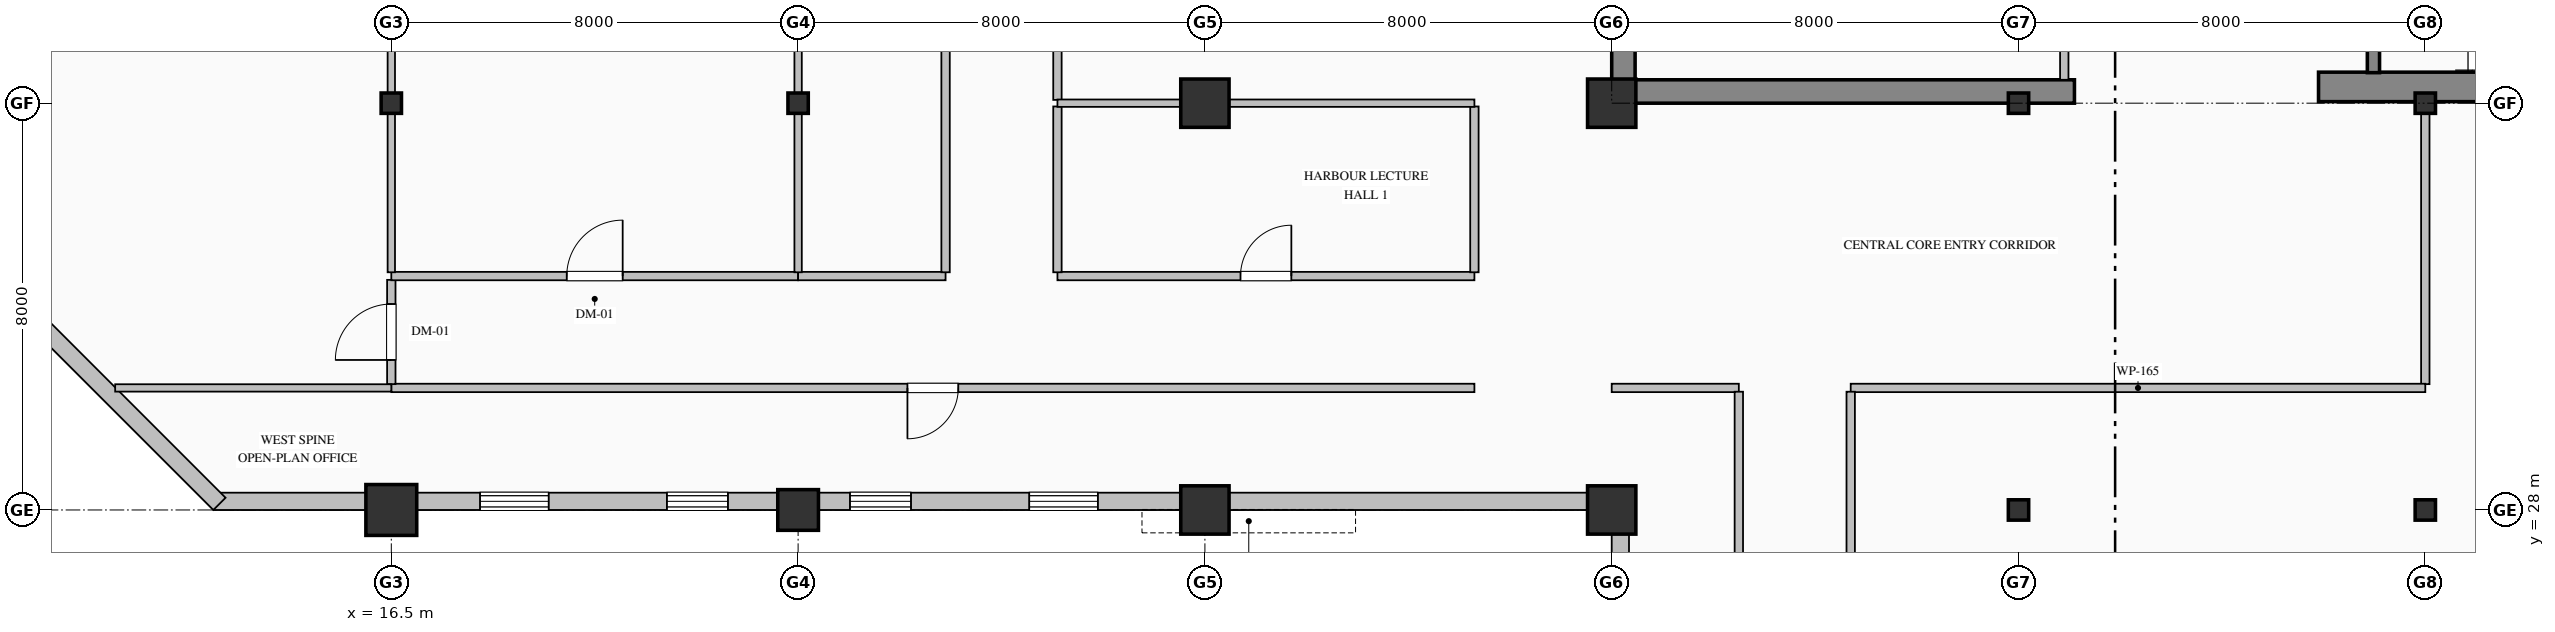
"""IFC4 building model, lengths in metres.
Left out: names, types, materials, properties, quantities, classifications, styles, units other than length and angle.
Written with IfcOpenShell. Run it as: python <this file> out.ifc"""

import sys

from ifc_helpers import new_model, si_unit, direction, frame, frame_2d, origin, origin_2d, place, context, subcontext, project, spatial, rectangle, hollow_rectangle, hollow_circle, i_section, extrude, element, fill, save


model = new_model("IFC4")
c1 = context("Model", 3, precision=1e-05, world=origin(), true_north=direction((0.0, 1.0)))
c2 = subcontext(c1, "Body", "Model", "MODEL_VIEW")
j1 = project(units=[si_unit("LENGTHUNIT", "METRE"), si_unit("PLANEANGLEUNIT", "RADIAN")], contexts=[c1])
p1 = place(None, origin())
s1 = spatial("IfcSite", under=j1, at=p1, CompositionType="ELEMENT")
p2 = place(p1, origin())
s2 = spatial("IfcBuilding", under=s1, at=p2, CompositionType="ELEMENT")
p3 = place(p2, frame((0.0, 0.0, 217.8)))
s3 = spatial("IfcBuildingStorey", under=s2, at=p3, CompositionType="ELEMENT", Elevation=217.8)
p4 = place(p3, frame((40.73, 36.46, 0.0), z_axis=(0.0, 0.0, 1.0), x_axis=(0.0, 1.0, 0.0)))
e1 = element("IfcWall", 1, at=p4, inside=s3, PredefinedType="SHEAR", context=c2, shape_type="SweptSolid", body=[
    extrude(rectangle(XDim=7.94, YDim=0.46, at=frame_2d((3.97, 0.0))), origin(), (0.0, 0.0, 1.0), 3.775),
])
p5 = place(p3, frame((40.5, 36.23, 0.0), z_axis=(0.0, 0.0, 1.0), x_axis=(1.0, 0.0, 0.0)))
e2 = element("IfcWall", 2, at=p5, inside=s3, PredefinedType="SHEAR", context=c2, shape_type="SweptSolid", body=[
    extrude(rectangle(XDim=9.1, YDim=0.46, at=frame_2d((4.55, 0.0))), origin(), (0.0, 0.0, 1.0), 3.775),
])
p6 = place(p3, frame((54.4, 36.32, 0.0), z_axis=(0.0, 0.0, 1.0), x_axis=(1.0, 0.0, 0.0)))
e3 = element("IfcWall", 3, at=p6, inside=s3, PredefinedType="SHEAR", context=c2, shape_type="SweptSolid", body=[
    extrude(rectangle(XDim=9.6, YDim=0.58, at=frame_2d((4.8, 0.0))), origin(), (0.0, 0.0, 1.0), 4.0),
])
p7 = place(p3, frame((16.5, 28.0, 0.0), z_axis=(0.0, 0.0, 1.0), x_axis=(1.0, 0.0, 0.0)))
e4 = element("IfcColumn", 4, at=p7, inside=s3, PredefinedType="COLUMN", context=c2, shape_type="SweptSolid", body=[
    extrude(hollow_circle(Radius=0.5, WallThickness=0.036, at=origin_2d()), origin(), (0.0, 0.0, 1.0), 4.0),
])
p8 = place(p3, frame((16.5, 36.0, 0.0), z_axis=(0.0, 0.0, 1.0), x_axis=(1.0, 0.0, 0.0)))
e5 = element("IfcColumn", 5, at=p8, inside=s3, PredefinedType="COLUMN", context=c2, shape_type="SweptSolid", body=[
    extrude(i_section(OverallWidth=0.4, OverallDepth=0.4, WebThickness=0.013, FlangeThickness=0.021, FilletRadius=0.022, at=origin_2d()), origin(), (0.0, 0.0, 1.0), 4.0),
])
p9 = place(p3, frame((24.5, 28.0, 0.0), z_axis=(0.0, 0.0, 1.0), x_axis=(1.0, 0.0, 0.0)))
e6 = element("IfcColumn", 6, at=p9, inside=s3, PredefinedType="COLUMN", context=c2, shape_type="SweptSolid", body=[
    extrude(hollow_rectangle(XDim=0.8, YDim=0.8, WallThickness=0.032, at=origin_2d()), origin(), (0.0, 0.0, 1.0), 4.0),
])
p10 = place(p3, frame((24.5, 36.0, 0.0), z_axis=(0.0, 0.0, 1.0), x_axis=(1.0, 0.0, 0.0)))
e7 = element("IfcColumn", 7, at=p10, inside=s3, PredefinedType="COLUMN", context=c2, shape_type="SweptSolid", body=[
    extrude(i_section(OverallWidth=0.4, OverallDepth=0.4, WebThickness=0.013, FlangeThickness=0.021, FilletRadius=0.022, at=origin_2d()), origin(), (0.0, 0.0, 1.0), 4.0),
])
for number, where, z_axis, x_axis in (
    (8, (32.5, 28.0, 0.0), (0.0, 0.0, 1.0), (1.0, 0.0, 0.0)),
    (9, (32.5, 36.0, 0.0), (0.0, 0.0, 1.0), (1.0, 0.0, 0.0)),
    (10, (40.5, 28.0, 0.0), (0.0, 0.0, 1.0), (1.0, 0.0, 0.0)),
    (11, (40.5, 36.0, 0.0), (0.0, 0.0, 1.0), (1.0, 0.0, 0.0)),
):
    element("IfcColumn", number, at=place(p3, frame(where, z_axis=z_axis, x_axis=x_axis)), inside=s3, PredefinedType="COLUMN", context=c2, shape_type="SweptSolid", body=[
        extrude(hollow_rectangle(XDim=0.95, YDim=0.95, WallThickness=0.036, at=origin_2d()), origin(), (0.0, 0.0, 1.0), 4.0),
    ])
for number, where, z_axis, x_axis in (
    (12, (48.5, 28.0, 0.0), (0.0, 0.0, 1.0), (1.0, 0.0, 0.0)),
    (13, (48.5, 36.0, 0.0), (0.0, 0.0, 1.0), (1.0, 0.0, 0.0)),
    (14, (56.5, 28.0, 0.0), (0.0, 0.0, 1.0), (1.0, 0.0, 0.0)),
    (15, (56.5, 36.0, 0.0), (0.0, 0.0, 1.0), (1.0, 0.0, 0.0)),
):
    element("IfcColumn", number, at=place(p3, frame(where, z_axis=z_axis, x_axis=x_axis)), inside=s3, PredefinedType="COLUMN", context=c2, shape_type="SweptSolid", body=[
        extrude(i_section(OverallWidth=0.4, OverallDepth=0.4, WebThickness=0.013, FlangeThickness=0.021, FilletRadius=0.022, at=origin_2d()), origin(), (0.0, 0.0, 1.0), 4.0),
    ])
p11 = place(p3, frame((40.67, 16.5, 0.0), z_axis=(0.0, 0.0, 1.0), x_axis=(0.0, 1.0, 0.0)))
e16 = element("IfcWall", 16, at=p11, inside=s3, PredefinedType="SOLIDWALL", context=c2, shape_type="SweptSolid", body=[
    extrude(rectangle(XDim=11.84, YDim=0.34, at=frame_2d((5.92, 0.0))), origin(), (0.0, 0.0, 1.0), 3.187),
])
p12 = place(p11, frame((2.925, 0.0, 0.9)))
e17 = element("IfcOpeningElement", 17, at=p12, cuts=e16, PredefinedType="OPENING", context=c2, shape_type="SweptSolid", body=[
    extrude(rectangle(XDim=1.35, YDim=1.85, at=frame_2d((0.675, 0.925))), frame((0.0, 0.18, 0.0), z_axis=(0.0, -1.0, 0.0), x_axis=(1.0, 0.0, 0.0)), (0.0, 0.0, 1.0), 0.36),
])
p13 = place(p11, frame((6.6, 0.0, 0.7)))
e18 = element("IfcOpeningElement", 18, at=p13, cuts=e16, PredefinedType="OPENING", context=c2, shape_type="SweptSolid", body=[
    extrude(rectangle(XDim=1.2, YDim=1.85, at=frame_2d((0.6, 0.925))), frame((0.0, 0.18, 0.0), z_axis=(0.0, -1.0, 0.0), x_axis=(1.0, 0.0, 0.0)), (0.0, 0.0, 1.0), 0.36),
])
p14 = place(p3, frame((40.52, 28.17, 0.0), z_axis=(0.0, 0.0, 1.0), x_axis=(-1.0, 0.0, 0.0)))
e19 = element("IfcWall", 19, at=p14, inside=s3, PredefinedType="SOLIDWALL", context=c2, shape_type="SweptSolid", body=[
    extrude(rectangle(XDim=27.52, YDim=0.34, at=frame_2d((13.76, 0.0))), origin(), (0.0, 0.0, 1.0), 3.187),
])
p15 = place(p14, frame((10.125, 0.0, 0.9)))
e20 = element("IfcOpeningElement", 20, at=p15, cuts=e19, PredefinedType="OPENING", context=c2, shape_type="SweptSolid", body=[
    extrude(rectangle(XDim=1.35, YDim=1.85, at=frame_2d((0.675, 0.925))), frame((0.0, 0.18, 0.0), z_axis=(0.0, -1.0, 0.0), x_axis=(1.0, 0.0, 0.0)), (0.0, 0.0, 1.0), 0.36),
])
p16 = place(p14, frame((13.8, 0.0, 0.7)))
e21 = element("IfcOpeningElement", 21, at=p16, cuts=e19, PredefinedType="OPENING", context=c2, shape_type="SweptSolid", body=[
    extrude(rectangle(XDim=1.2, YDim=1.85, at=frame_2d((0.6, 0.925))), frame((0.0, 0.18, 0.0), z_axis=(0.0, -1.0, 0.0), x_axis=(1.0, 0.0, 0.0)), (0.0, 0.0, 1.0), 0.36),
])
p17 = place(p14, frame((17.4, 0.0, 0.9)))
e22 = element("IfcOpeningElement", 22, at=p17, cuts=e19, PredefinedType="OPENING", context=c2, shape_type="SweptSolid", body=[
    extrude(rectangle(XDim=1.2, YDim=1.85, at=frame_2d((0.6, 0.925))), frame((0.0, 0.18, 0.0), z_axis=(0.0, -1.0, 0.0), x_axis=(1.0, 0.0, 0.0)), (0.0, 0.0, 1.0), 0.36),
])
p18 = place(p14, frame((20.925, 0.0, 0.9)))
e23 = element("IfcOpeningElement", 23, at=p18, cuts=e19, PredefinedType="OPENING", context=c2, shape_type="SweptSolid", body=[
    extrude(rectangle(XDim=1.35, YDim=1.85, at=frame_2d((0.675, 0.925))), frame((0.0, 0.18, 0.0), z_axis=(0.0, -1.0, 0.0), x_axis=(1.0, 0.0, 0.0)), (0.0, 0.0, 1.0), 0.36),
])
p19 = place(p3, frame((13.12, 28.12, 0.0), z_axis=(0.0, 0.0, 1.0), x_axis=(-0.707106781187, 0.707106781187, 0.0)))
e24 = element("IfcWall", 24, at=p19, inside=s3, PredefinedType="SOLIDWALL", context=c2, shape_type="SweptSolid", body=[
    extrude(rectangle(XDim=5.657, YDim=0.34, at=frame_2d((2.828, 0.0))), origin(), (0.0, 0.0, 1.0), 3.775),
])
p20 = place(p3, frame((55.48, 39.75, 0.0), z_axis=(0.0, 0.0, 1.0), x_axis=(0.0, -1.0, 0.0)))
e25 = element("IfcWall", 25, at=p20, inside=s3, PredefinedType="SOLIDWALL", context=c2, shape_type="SweptSolid", body=[
    extrude(rectangle(XDim=3.15, YDim=0.24, at=frame_2d((1.575, 0.0))), origin(), (0.0, 0.0, 1.0), 4.0),
])
p21 = place(p20, frame((1.0, 0.0, 0.0)))
e26 = element("IfcOpeningElement", 26, at=p21, cuts=e25, PredefinedType="OPENING", context=c2, shape_type="SweptSolid", body=[
    extrude(rectangle(XDim=1.15, YDim=2.2, at=frame_2d((0.575, 1.1))), frame((0.0, 0.13, 0.0), z_axis=(0.0, -1.0, 0.0), x_axis=(1.0, 0.0, 0.0)), (0.0, 0.0, 1.0), 0.26),
])
p22 = place(p3, frame((49.4, 36.46, 0.0), z_axis=(0.0, 0.0, 1.0), x_axis=(0.0, 1.0, 0.0)))
e27 = element("IfcWall", 27, at=p22, inside=s3, PredefinedType="PARTITIONING", context=c2, shape_type="SweptSolid", body=[
    extrude(rectangle(XDim=7.69, YDim=0.165, at=frame_2d((3.845, 0.0))), origin(), (0.0, 0.0, 1.0), 3.017),
])
p23 = place(p22, frame((3.345, 0.0, 0.0)))
e28 = element("IfcOpeningElement", 28, at=p23, cuts=e27, PredefinedType="OPENING", context=c2, shape_type="SweptSolid", body=[
    extrude(rectangle(XDim=1.0, YDim=2.15, at=frame_2d((0.5, 1.075))), frame((0.0, 0.093, 0.0), z_axis=(0.0, -1.0, 0.0), x_axis=(1.0, 0.0, 0.0)), (0.0, 0.0, 1.0), 0.185),
])
p24 = place(p3, frame((37.8, 30.4, 0.0), z_axis=(0.0, 0.0, 1.0), x_axis=(-1.0, 0.0, 0.0)))
e29 = element("IfcWall", 29, at=p24, inside=s3, PredefinedType="PARTITIONING", context=c2, shape_type="SweptSolid", body=[
    extrude(rectangle(XDim=21.3, YDim=0.165, at=frame_2d((10.65, 0.0))), origin(), (0.0, 0.0, 1.0), 3.775),
])
p25 = place(p24, frame((10.15, 0.0, 0.0)))
e30 = element("IfcOpeningElement", 30, at=p25, cuts=e29, PredefinedType="OPENING", context=c2, shape_type="SweptSolid", body=[
    extrude(rectangle(XDim=1.0, YDim=2.15, at=frame_2d((0.5, 1.075))), frame((0.0, 0.093, 0.0), z_axis=(0.0, -1.0, 0.0), x_axis=(1.0, 0.0, 0.0)), (0.0, 0.0, 1.0), 0.185),
])
p26 = place(p3, frame((16.5, 30.475, 0.0), z_axis=(0.0, 0.0, 1.0), x_axis=(0.0, 1.0, 0.0)))
e31 = element("IfcWall", 31, at=p26, inside=s3, PredefinedType="PARTITIONING", context=c2, shape_type="SweptSolid", body=[
    extrude(rectangle(XDim=2.051, YDim=0.165, at=frame_2d((1.025, 0.0))), origin(), (0.0, 0.0, 1.0), 3.179),
])
p27 = place(p26, frame((0.476, 0.0, 0.0)))
e32 = element("IfcOpeningElement", 32, at=p27, cuts=e31, PredefinedType="OPENING", context=c2, shape_type="SweptSolid", body=[
    extrude(rectangle(XDim=1.1, YDim=2.2, at=frame_2d((0.55, 1.1))), frame((0.0, 0.093, 0.0), z_axis=(0.0, -1.0, 0.0), x_axis=(1.0, 0.0, 0.0)), (0.0, 0.0, 1.0), 0.185),
])
p28 = place(p3, frame((16.5, 32.6, 0.0), z_axis=(0.0, 0.0, 1.0), x_axis=(1.0, 0.0, 0.0)))
e33 = element("IfcWall", 33, at=p28, inside=s3, PredefinedType="PARTITIONING", context=c2, shape_type="SweptSolid", body=[
    extrude(rectangle(XDim=8.0, YDim=0.165, at=frame_2d((4.0, 0.0))), origin(), (0.0, 0.0, 1.0), 3.775),
])
p29 = place(p28, frame((3.45, 0.0, 0.0)))
e34 = element("IfcOpeningElement", 34, at=p29, cuts=e33, PredefinedType="OPENING", context=c2, shape_type="SweptSolid", body=[
    extrude(rectangle(XDim=1.1, YDim=2.2, at=frame_2d((0.55, 1.1))), frame((0.0, 0.093, 0.0), z_axis=(0.0, -1.0, 0.0), x_axis=(1.0, 0.0, 0.0)), (0.0, 0.0, 1.0), 0.185),
])
p30 = place(p3, frame((24.5, 32.6, 0.0), z_axis=(0.0, 0.0, 1.0), x_axis=(1.0, 0.0, 0.0)))
e35 = element("IfcWall", 35, at=p30, inside=s3, PredefinedType="PARTITIONING", context=c2, shape_type="SweptSolid", body=[
    extrude(rectangle(XDim=2.9, YDim=0.165, at=frame_2d((1.45, 0.0))), origin(), (0.0, 0.0, 1.0), 3.775),
])
p31 = place(p3, frame((29.6, 32.6, 0.0), z_axis=(0.0, 0.0, 1.0), x_axis=(1.0, 0.0, 0.0)))
e36 = element("IfcWall", 36, at=p31, inside=s3, PredefinedType="PARTITIONING", context=c2, shape_type="SweptSolid", body=[
    extrude(rectangle(XDim=8.2, YDim=0.165, at=frame_2d((4.1, 0.0))), origin(), (0.0, 0.0, 1.0), 3.775),
])
p32 = place(p31, frame((3.6, 0.0, 0.0)))
e37 = element("IfcOpeningElement", 37, at=p32, cuts=e36, PredefinedType="OPENING", context=c2, shape_type="SweptSolid", body=[
    extrude(rectangle(XDim=1.0, YDim=2.15, at=frame_2d((0.5, 1.075))), frame((0.0, 0.093, 0.0), z_axis=(0.0, -1.0, 0.0), x_axis=(1.0, 0.0, 0.0)), (0.0, 0.0, 1.0), 0.185),
])
p33 = place(p3, frame((27.4, 32.675, 0.0), z_axis=(0.0, 0.0, 1.0), x_axis=(0.0, 1.0, 0.0)))
e38 = element("IfcWall", 38, at=p33, inside=s3, PredefinedType="PARTITIONING", context=c2, shape_type="SweptSolid", body=[
    extrude(rectangle(XDim=13.725, YDim=0.165, at=frame_2d((6.863, 0.0))), origin(), (0.0, 0.0, 1.0), 3.775),
])
p34 = place(p33, frame((6.363, 0.0, 0.0)))
e39 = element("IfcOpeningElement", 39, at=p34, cuts=e38, PredefinedType="OPENING", context=c2, shape_type="SweptSolid", body=[
    extrude(rectangle(XDim=1.0, YDim=2.15, at=frame_2d((0.5, 1.075))), frame((0.0, 0.093, 0.0), z_axis=(0.0, -1.0, 0.0), x_axis=(1.0, 0.0, 0.0)), (0.0, 0.0, 1.0), 0.185),
])
p35 = place(p3, frame((29.6, 35.936, 0.0), z_axis=(0.0, 0.0, 1.0), x_axis=(0.0, -1.0, 0.0)))
e40 = element("IfcWall", 40, at=p35, inside=s3, PredefinedType="PARTITIONING", context=c2, shape_type="SweptSolid", body=[
    extrude(rectangle(XDim=3.261, YDim=0.165, at=frame_2d((1.63, 0.0))), origin(), (0.0, 0.0, 1.0), 3.775),
])
p36 = place(p3, frame((29.6, 41.2, 0.0), z_axis=(0.0, 0.0, 1.0), x_axis=(0.0, -1.0, 0.0)))
e41 = element("IfcWall", 41, at=p36, inside=s3, PredefinedType="PARTITIONING", context=c2, shape_type="SweptSolid", body=[
    extrude(rectangle(XDim=5.135, YDim=0.165, at=frame_2d((2.568, 0.0))), origin(), (0.0, 0.0, 1.0), 3.775),
])
p37 = place(p36, frame((2.068, 0.0, 0.0)))
e42 = element("IfcOpeningElement", 42, at=p37, cuts=e41, PredefinedType="OPENING", context=c2, shape_type="SweptSolid", body=[
    extrude(rectangle(XDim=1.0, YDim=2.15, at=frame_2d((0.5, 1.075))), frame((0.0, 0.093, 0.0), z_axis=(0.0, -1.0, 0.0), x_axis=(1.0, 0.0, 0.0)), (0.0, 0.0, 1.0), 0.185),
])
p38 = place(p3, frame((56.5, 36.0, 0.0), z_axis=(0.0, 0.0, 1.0), x_axis=(0.0, -1.0, 0.0)))
e43 = element("IfcWall", 43, at=p38, inside=s3, PredefinedType="PARTITIONING", context=c2, shape_type="SweptSolid", body=[
    extrude(rectangle(XDim=5.525, YDim=0.165, at=frame_2d((2.763, 0.0))), origin(), (0.0, 0.0, 1.0), 3.179),
])
p39 = place(p3, frame((56.5, 30.4, 0.0), z_axis=(0.0, 0.0, 1.0), x_axis=(-1.0, 0.0, 0.0)))
e44 = element("IfcWall", 44, at=p39, inside=s3, PredefinedType="PARTITIONING", context=c2, shape_type="SweptSolid", body=[
    extrude(rectangle(XDim=11.3, YDim=0.165, at=frame_2d((5.65, 0.0))), origin(), (0.0, 0.0, 1.0), 3.775),
])
p40 = place(p3, frame((37.8, 32.675, 0.0), z_axis=(0.0, 0.0, 1.0), x_axis=(0.0, 1.0, 0.0)))
e45 = element("IfcWall", 45, at=p40, inside=s3, PredefinedType="PARTITIONING", context=c2, shape_type="SweptSolid", body=[
    extrude(rectangle(XDim=3.261, YDim=0.165, at=frame_2d((1.63, 0.0))), origin(), (0.0, 0.0, 1.0), 3.775),
])
p41 = place(p3, frame((43.0, 30.4, 0.0), z_axis=(0.0, 0.0, 1.0), x_axis=(-1.0, 0.0, 0.0)))
e46 = element("IfcWall", 46, at=p41, inside=s3, PredefinedType="PARTITIONING", context=c2, shape_type="SweptSolid", body=[
    extrude(rectangle(XDim=2.5, YDim=0.165, at=frame_2d((1.25, 0.0))), origin(), (0.0, 0.0, 1.0), 3.775),
])
p42 = place(p3, frame((45.2, 30.325, 0.0), z_axis=(0.0, 0.0, 1.0), x_axis=(0.0, -1.0, 0.0)))
e47 = element("IfcWall", 47, at=p42, inside=s3, PredefinedType="PARTITIONING", context=c2, shape_type="SweptSolid", body=[
    extrude(rectangle(XDim=6.851, YDim=0.165, at=frame_2d((3.425, 0.0))), origin(), (0.0, 0.0, 1.0), 3.775),
])
p43 = place(p3, frame((43.0, 21.274, 0.0), z_axis=(0.0, 0.0, 1.0), x_axis=(0.0, 1.0, 0.0)))
e48 = element("IfcWall", 48, at=p43, inside=s3, PredefinedType="PARTITIONING", context=c2, shape_type="SweptSolid", body=[
    extrude(rectangle(XDim=9.051, YDim=0.165, at=frame_2d((4.525, 0.0))), origin(), (0.0, 0.0, 1.0), 3.775),
])
p44 = place(p43, frame((3.976, 0.0, 0.0)))
e49 = element("IfcOpeningElement", 49, at=p44, cuts=e48, PredefinedType="OPENING", context=c2, shape_type="SweptSolid", body=[
    extrude(rectangle(XDim=1.1, YDim=2.2, at=frame_2d((0.55, 1.1))), frame((0.0, 0.093, 0.0), z_axis=(0.0, -1.0, 0.0), x_axis=(1.0, 0.0, 0.0)), (0.0, 0.0, 1.0), 0.185),
])
p45 = place(p3, frame((11.07, 30.4, 0.0), z_axis=(0.0, 0.0, 1.0), x_axis=(1.0, 0.0, 0.0)))
e50 = element("IfcWall", 50, at=p45, inside=s3, PredefinedType="PARTITIONING", context=c2, shape_type="SweptSolid", body=[
    extrude(rectangle(XDim=5.43, YDim=0.145, at=frame_2d((2.715, 0.0))), origin(), (0.0, 0.0, 1.0), 3.775),
])
for number, where, z_axis, x_axis in (
    (51, (16.5, 51.668, 0.0), (0.0, 0.0, 1.0), (0.0, -1.0, 0.0)),
    (52, (24.5, 51.668, 0.0), (0.0, 0.0, 1.0), (0.0, -1.0, 0.0)),
):
    element("IfcWall", number, at=place(p3, frame(where, z_axis=z_axis, x_axis=x_axis)), inside=s3, PredefinedType="PARTITIONING", context=c2, shape_type="SweptSolid", body=[
        extrude(rectangle(XDim=18.993, YDim=0.145, at=frame_2d((9.497, 0.0))), origin(), (0.0, 0.0, 1.0), 3.179),
    ])
p46 = place(p3, frame((29.6, 36.0, 0.0), z_axis=(0.0, 0.0, 1.0), x_axis=(1.0, 0.0, 0.0)))
e53 = element("IfcWall", 53, at=p46, inside=s3, PredefinedType="PARTITIONING", context=c2, shape_type="SweptSolid", body=[
    extrude(rectangle(XDim=8.2, YDim=0.145, at=frame_2d((4.1, 0.0))), origin(), (0.0, 0.0, 1.0), 3.179),
])
p47 = place(p15, origin())
e54 = element("IfcWindow", 54, at=p47, inside=s3, PartitioningType="DOUBLE_PANEL_VERTICAL", PredefinedType="WINDOW", context=c2, shape_type="SweptSolid", body=[
    extrude(rectangle(XDim=1.35, YDim=1.85, at=frame_2d((0.675, 0.925))), frame((0.0, 0.15, 0.0), z_axis=(0.0, -1.0, 0.0), x_axis=(1.0, 0.0, 0.0)), (0.0, 0.0, 1.0), 0.06),
])
fill(e20, e54)
p48 = place(p16, origin())
e55 = element("IfcWindow", 55, at=p48, inside=s3, PartitioningType="DOUBLE_PANEL_VERTICAL", PredefinedType="WINDOW", context=c2, shape_type="SweptSolid", body=[
    extrude(rectangle(XDim=1.2, YDim=1.85, at=frame_2d((0.6, 0.925))), frame((0.0, 0.15, 0.0), z_axis=(0.0, -1.0, 0.0), x_axis=(1.0, 0.0, 0.0)), (0.0, 0.0, 1.0), 0.06),
])
fill(e21, e55)
p49 = place(p17, origin())
e56 = element("IfcWindow", 56, at=p49, inside=s3, PartitioningType="DOUBLE_PANEL_VERTICAL", PredefinedType="WINDOW", context=c2, shape_type="SweptSolid", body=[
    extrude(rectangle(XDim=1.2, YDim=1.85, at=frame_2d((0.6, 0.925))), frame((0.0, 0.15, 0.0), z_axis=(0.0, -1.0, 0.0), x_axis=(1.0, 0.0, 0.0)), (0.0, 0.0, 1.0), 0.06),
])
fill(e22, e56)
p50 = place(p18, origin())
e57 = element("IfcWindow", 57, at=p50, inside=s3, PartitioningType="DOUBLE_PANEL_VERTICAL", PredefinedType="WINDOW", context=c2, shape_type="SweptSolid", body=[
    extrude(rectangle(XDim=1.35, YDim=1.85, at=frame_2d((0.675, 0.925))), frame((0.0, 0.15, 0.0), z_axis=(0.0, -1.0, 0.0), x_axis=(1.0, 0.0, 0.0)), (0.0, 0.0, 1.0), 0.06),
])
fill(e23, e57)
p51 = place(p25, origin())
e58 = element("IfcDoor", 58, at=p51, inside=s3, OperationType="SINGLE_SWING_RIGHT", PredefinedType="DOOR", context=c2, shape_type="SweptSolid", body=[
    extrude(rectangle(XDim=1.0, YDim=2.15, at=frame_2d((0.5, 1.075))), frame((0.0, 0.025, 0.0), z_axis=(0.0, -1.0, 0.0), x_axis=(1.0, 0.0, 0.0)), (0.0, 0.0, 1.0), 0.05),
])
fill(e30, e58)
p52 = place(p27, origin())
e59 = element("IfcDoor", 59, at=p52, inside=s3, OperationType="SINGLE_SWING_LEFT", PredefinedType="DOOR", context=c2, shape_type="SweptSolid", body=[
    extrude(rectangle(XDim=1.1, YDim=2.2, at=frame_2d((0.55, 1.1))), frame((0.0, 0.025, 0.0), z_axis=(0.0, -1.0, 0.0), x_axis=(1.0, 0.0, 0.0)), (0.0, 0.0, 1.0), 0.05),
])
fill(e32, e59)
p53 = place(p29, origin())
e60 = element("IfcDoor", 60, at=p53, inside=s3, OperationType="SINGLE_SWING_RIGHT", PredefinedType="DOOR", context=c2, shape_type="SweptSolid", body=[
    extrude(rectangle(XDim=1.1, YDim=2.2, at=frame_2d((0.55, 1.1))), frame((0.0, 0.025, 0.0), z_axis=(0.0, -1.0, 0.0), x_axis=(1.0, 0.0, 0.0)), (0.0, 0.0, 1.0), 0.05),
])
fill(e34, e60)
p54 = place(p32, origin())
e61 = element("IfcDoor", 61, at=p54, inside=s3, OperationType="SINGLE_SWING_RIGHT", PredefinedType="DOOR", context=c2, shape_type="SweptSolid", body=[
    extrude(rectangle(XDim=1.0, YDim=2.15, at=frame_2d((0.5, 1.075))), frame((0.0, 0.025, 0.0), z_axis=(0.0, -1.0, 0.0), x_axis=(1.0, 0.0, 0.0)), (0.0, 0.0, 1.0), 0.05),
])
fill(e37, e61)
save(model, sys.argv[1])
